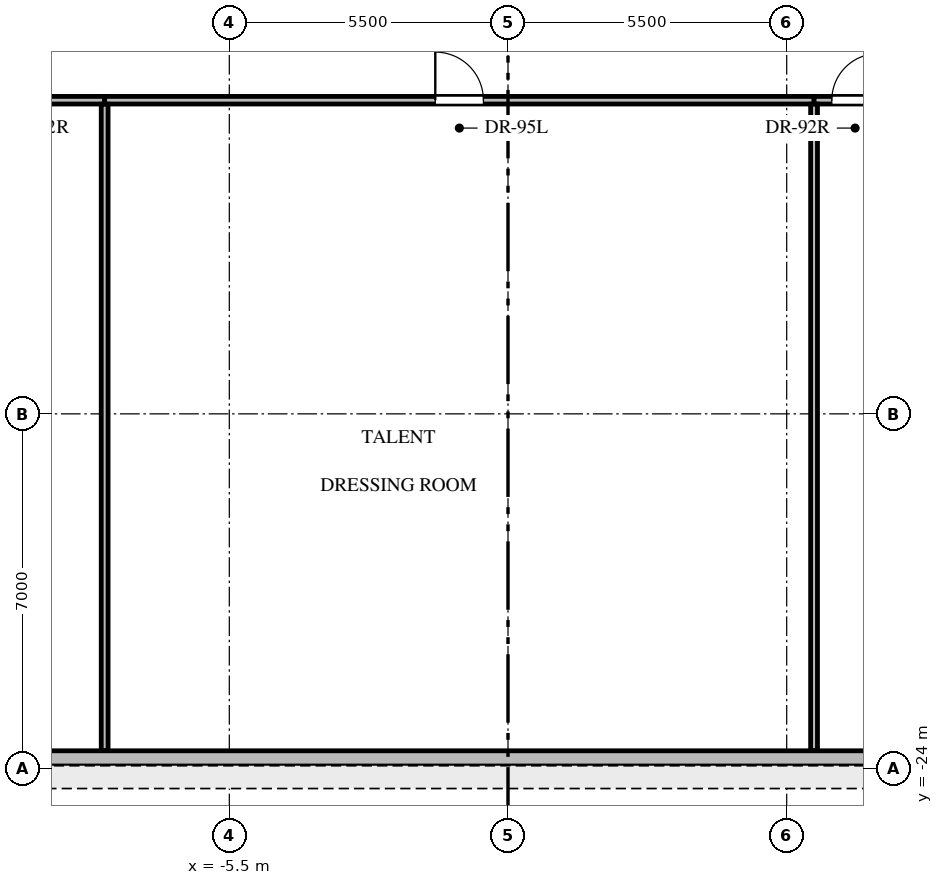
"""IFC4 building model, lengths in metres.
Left out: names, types, materials, properties, quantities, classifications, styles, units other than length and angle.
Written with IfcOpenShell. Run it as: python <this file> out.ifc"""

import sys

from ifc_helpers import new_model, si_unit, direction, frame, frame_2d, origin, place, context, subcontext, project, spatial, rectangle, extrude, source, transform, mapped, element, fill, save


model = new_model("IFC4")
c1 = context("Model", 3, precision=1e-05, world=origin(), true_north=direction((0.0, 1.0)))
c2 = subcontext(c1, "Body", "Model", "MODEL_VIEW")
j1 = project(units=[si_unit("LENGTHUNIT", "METRE"), si_unit("PLANEANGLEUNIT", "RADIAN")], contexts=[c1])
p1 = place(None, origin())
s1 = spatial("IfcSite", under=j1, at=p1, CompositionType="ELEMENT")
p2 = place(p1, origin())
s2 = spatial("IfcBuilding", under=s1, at=p2, CompositionType="ELEMENT")
p3 = place(p2, frame((0.0, 0.0, 15.6)))
s3 = spatial("IfcBuildingStorey", under=s2, at=p3, CompositionType="ELEMENT", Elevation=15.6)
p4 = place(p3, frame((13.103, -23.8, 0.0), z_axis=(0.0, 0.0, 1.0), x_axis=(-1.0, 0.0, 0.0)))
e1 = element("IfcWall", 1, at=p4, inside=s3, PredefinedType="SOLIDWALL", context=c2, shape_type="SweptSolid", body=[
    extrude(rectangle(XDim=27.578, YDim=0.3, at=frame_2d((13.789, 0.0))), origin(), (0.0, 0.0, 1.0), 5.28),
])
p5 = place(p4, frame((3.0, 0.0, 1.0)))
e2 = element("IfcOpeningElement", 2, at=p5, cuts=e1, PredefinedType="OPENING", context=c2, shape_type="SweptSolid", body=[
    extrude(rectangle(XDim=2.4, YDim=2.1, at=frame_2d((1.2, 1.05))), frame((0.0, 0.16, 0.0), z_axis=(0.0, -1.0, 0.0), x_axis=(1.0, 0.0, 0.0)), (0.0, 0.0, 1.0), 0.32),
])
p6 = place(p4, frame((22.178, 0.0, 1.0)))
e3 = element("IfcOpeningElement", 3, at=p6, cuts=e1, PredefinedType="OPENING", context=c2, shape_type="SweptSolid", body=[
    extrude(rectangle(XDim=2.4, YDim=2.1, at=frame_2d((1.2, 1.05))), frame((0.0, 0.16, 0.0), z_axis=(0.0, -1.0, 0.0), x_axis=(1.0, 0.0, 0.0)), (0.0, 0.0, 1.0), 0.32),
])
p7 = place(p3, frame((-12.89, -10.81, 0.0), z_axis=(0.0, 0.0, 1.0), x_axis=(1.0, 0.0, 0.0)))
e4 = element("IfcWall", 4, at=p7, inside=s3, PredefinedType="PARTITIONING", context=c2, shape_type="SweptSolid", body=[
    extrude(rectangle(XDim=4.93, YDim=0.15, at=frame_2d((2.465, 0.0))), origin(), (0.0, 0.0, 1.0), 4.284),
])
p8 = place(p7, frame((2.005, 0.0, 0.0)))
e5 = element("IfcOpeningElement", 5, at=p8, cuts=e4, PredefinedType="OPENING", context=c2, shape_type="SweptSolid", body=[
    extrude(rectangle(XDim=0.92, YDim=2.1, at=frame_2d((0.46, 1.05))), frame((0.0, 0.085, 0.0), z_axis=(0.0, -1.0, 0.0), x_axis=(1.0, 0.0, 0.0)), (0.0, 0.0, 1.0), 0.17),
])
p9 = place(p3, frame((-7.96, -10.81, 0.0), z_axis=(0.0, 0.0, 1.0), x_axis=(1.0, 0.0, 0.0)))
e6 = element("IfcWall", 6, at=p9, inside=s3, PredefinedType="PARTITIONING", context=c2, shape_type="SweptSolid", body=[
    extrude(rectangle(XDim=14.0, YDim=0.15, at=frame_2d((7.0, 0.0))), origin(), (0.0, 0.0, 1.0), 4.284),
])
p10 = place(p9, frame((6.525, 0.0, 0.0)))
e7 = element("IfcOpeningElement", 7, at=p10, cuts=e6, PredefinedType="OPENING", context=c2, shape_type="SweptSolid", body=[
    extrude(rectangle(XDim=0.95, YDim=2.1, at=frame_2d((0.475, 1.05))), frame((0.0, 0.085, 0.0), z_axis=(0.0, -1.0, 0.0), x_axis=(1.0, 0.0, 0.0)), (0.0, 0.0, 1.0), 0.17),
])
p11 = place(p3, frame((6.04, -10.81, 0.0), z_axis=(0.0, 0.0, 1.0), x_axis=(1.0, 0.0, 0.0)))
e8 = element("IfcWall", 8, at=p11, inside=s3, PredefinedType="PARTITIONING", context=c2, shape_type="SweptSolid", body=[
    extrude(rectangle(XDim=6.85, YDim=0.15, at=frame_2d((3.425, 0.0))), origin(), (0.0, 0.0, 1.0), 5.265),
])
p12 = place(p11, frame((0.35, 0.0, 0.0)))
e9 = element("IfcOpeningElement", 9, at=p12, cuts=e8, PredefinedType="OPENING", context=c2, shape_type="SweptSolid", body=[
    extrude(rectangle(XDim=0.92, YDim=2.1, at=frame_2d((0.46, 1.05))), frame((0.0, 0.085, 0.0), z_axis=(0.0, -1.0, 0.0), x_axis=(1.0, 0.0, 0.0)), (0.0, 0.0, 1.0), 0.17),
])
for number, where, z_axis, x_axis in (
    (10, (-7.96, -10.889, 0.0), (0.0, 0.0, 1.0), (0.0, -1.0, 0.0)),
    (11, (6.04, -10.889, 0.0), (0.0, 0.0, 1.0), (0.0, -1.0, 0.0)),
):
    element("IfcWall", number, at=place(p3, frame(where, z_axis=z_axis, x_axis=x_axis)), inside=s3, PredefinedType="PARTITIONING", context=c2, shape_type="SweptSolid", body=[
        extrude(rectangle(XDim=12.756, YDim=0.135, at=frame_2d((6.378, 0.0))), origin(), (0.0, 0.0, 1.0), 4.284),
    ])
m1 = source(origin(), c2, "Body", "SweptSolid", [
    extrude(rectangle(XDim=0.95, YDim=2.1, at=frame_2d((0.475, 1.05))), frame((0.0, 0.025, 0.0), z_axis=(0.0, -1.0, 0.0), x_axis=(1.0, 0.0, 0.0)), (0.0, 0.0, 1.0), 0.05),
])
p13 = place(p10, origin())
e12 = element("IfcDoor", 12, at=p13, inside=s3, OperationType="SINGLE_SWING_LEFT", PredefinedType="DOOR", context=c2, shape_type="MappedRepresentation", body=[
    mapped(m1, transform((0.0, 0.0, 0.0), x_axis=(1.0, 0.0, 0.0), y_axis=(0.0, 1.0, 0.0), z_axis=(0.0, 0.0, 1.0), scale=1.0)),
])
fill(e7, e12)
m2 = source(origin(), c2, "Body", "SweptSolid", [
    extrude(rectangle(XDim=0.92, YDim=2.1, at=frame_2d((0.46, 1.05))), frame((0.0, 0.025, 0.0), z_axis=(0.0, -1.0, 0.0), x_axis=(1.0, 0.0, 0.0)), (0.0, 0.0, 1.0), 0.05),
])
p14 = place(p12, origin())
e13 = element("IfcDoor", 13, at=p14, inside=s3, OperationType="SINGLE_SWING_RIGHT", PredefinedType="DOOR", context=c2, shape_type="MappedRepresentation", body=[
    mapped(m2, transform((0.0, 0.0, 0.0), x_axis=(1.0, 0.0, 0.0), y_axis=(0.0, 1.0, 0.0), z_axis=(0.0, 0.0, 1.0), scale=1.0)),
])
fill(e9, e13)
save(model, sys.argv[1])
